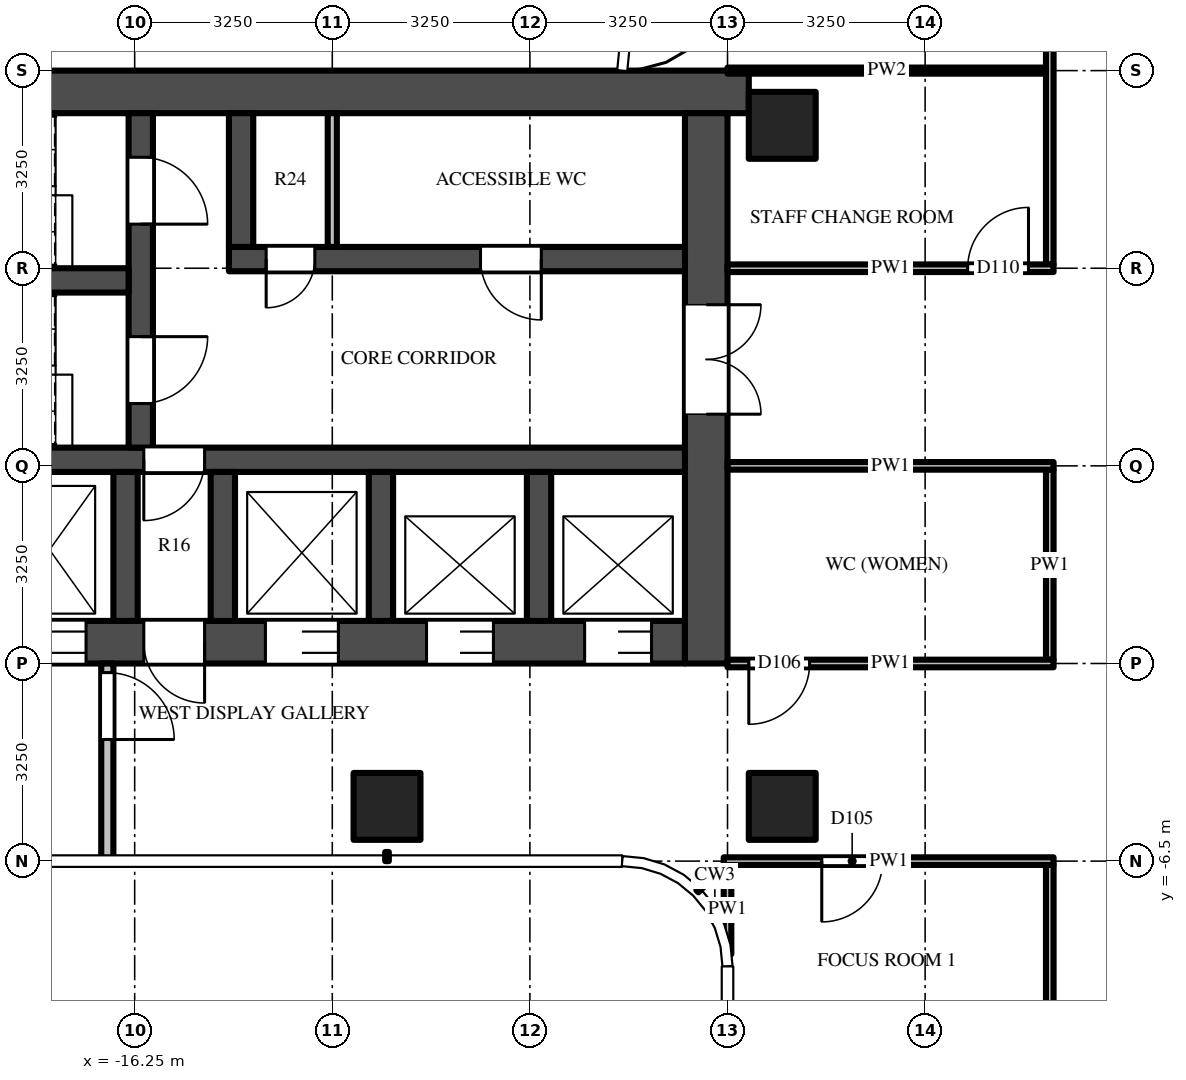
"""IFC4 building model, lengths in metres.
Left out: names, types, materials, properties, quantities, classifications, styles, units other than length and angle.
Written with IfcOpenShell. Run it as: python <this file> out.ifc"""

import sys

from ifc_helpers import new_model, si_unit, direction, frame, frame_2d, origin, origin_2d, place, context, subcontext, project, spatial, rectangle, extrude, source, transform, mapped, element, fill, save


model = new_model("IFC4")
c1 = context("Model", 3, precision=1e-05, world=origin(), true_north=direction((0.0, 1.0)))
c2 = subcontext(c1, "Body", "Model", "MODEL_VIEW")
j1 = project(units=[si_unit("LENGTHUNIT", "METRE"), si_unit("PLANEANGLEUNIT", "RADIAN")], contexts=[c1])
p1 = place(None, origin())
s1 = spatial("IfcSite", under=j1, at=p1, CompositionType="ELEMENT")
p2 = place(p1, origin())
s2 = spatial("IfcBuilding", under=s1, at=p2, CompositionType="ELEMENT")
p3 = place(p2, frame((0.0, 0.0, 220.7)))
s3 = spatial("IfcBuildingStorey", under=s2, at=p3, CompositionType="ELEMENT", Elevation=220.7)
m1 = source(origin(), c2, "Body", "SweptSolid", [
    extrude(rectangle(XDim=1.1, YDim=1.1, at=origin_2d()), origin(), (0.0, 0.0, 1.0), 3.9),
])
for number, where, z_axis, x_axis in (
    (1, (-5.6, 5.6, 0.0), (0.0, 0.0, 1.0), (1.0, 0.0, 0.0)),
    (2, (-5.6, -5.6, 0.0), (0.0, 0.0, 1.0), (1.0, 0.0, 0.0)),
    (3, (-12.1, -5.6, 0.0), (0.0, 0.0, 1.0), (1.0, 0.0, 0.0)),
):
    element("IfcColumn", number, at=place(p3, frame(where, z_axis=z_axis, x_axis=x_axis)), inside=s3, PredefinedType="COLUMN", context=c2, shape_type="MappedRepresentation", body=[
        mapped(m1, transform((0.0, 0.0, 0.0))),
    ])
m2 = source(origin(), c2, "Body", "SweptSolid", [
    extrude(rectangle(XDim=16.6, YDim=0.7, at=frame_2d((8.3, 0.0))), origin(), (0.0, 0.0, 1.0), 3.7),
])
p4 = place(p3, frame((-6.15, 6.15, 0.0), z_axis=(0.0, 0.0, 1.0), x_axis=(-1.0, 0.0, 0.0)))
e4 = element("IfcWall", 4, at=p4, inside=s3, PredefinedType="SHEAR", context=c2, shape_type="MappedRepresentation", body=[
    mapped(m2, transform((0.0, 0.0, 0.0))),
])
m3 = source(origin(), c2, "Body", "SweptSolid", [
    extrude(rectangle(XDim=14.85, YDim=0.7, at=frame_2d((7.425, 0.0))), origin(), (0.0, 0.0, 1.0), 3.7),
])
p5 = place(p3, frame((-7.2, -2.9, 0.0), z_axis=(0.0, 0.0, 1.0), x_axis=(-1.0, 0.0, 0.0)))
e5 = element("IfcWall", 5, at=p5, inside=s3, PredefinedType="SHEAR", context=c2, shape_type="MappedRepresentation", body=[
    mapped(m3, transform((0.0, 0.0, 0.0))),
])
m4 = source(origin(), c2, "Body", "SweptSolid", [
    extrude(rectangle(XDim=1.1, YDim=2.1, at=frame_2d((0.55, 1.05))), frame((0.0, 0.36, 0.0), z_axis=(0.0, -1.0, 0.0), x_axis=(1.0, 0.0, 0.0)), (0.0, 0.0, 1.0), 0.72),
])
p6 = place(p5, frame((0.55, 0.0, 0.0)))
e6 = element("IfcOpeningElement", 6, at=p6, cuts=e5, PredefinedType="OPENING", context=c2, shape_type="MappedRepresentation", body=[
    mapped(m4, transform((0.0, 0.0, 0.0))),
])
p7 = place(p5, frame((3.15, 0.0, 0.0)))
e7 = element("IfcOpeningElement", 7, at=p7, cuts=e5, PredefinedType="OPENING", context=c2, shape_type="MappedRepresentation", body=[
    mapped(m4, transform((0.0, 0.0, 0.0))),
])
m5 = source(origin(), c2, "Body", "SweptSolid", [
    extrude(rectangle(XDim=1.2, YDim=2.1, at=frame_2d((0.6, 1.05))), frame((0.0, 0.36, 0.0), z_axis=(0.0, -1.0, 0.0), x_axis=(1.0, 0.0, 0.0)), (0.0, 0.0, 1.0), 0.72),
])
p8 = place(p5, frame((5.7, 0.0, 0.0)))
e8 = element("IfcOpeningElement", 8, at=p8, cuts=e5, PredefinedType="OPENING", context=c2, shape_type="MappedRepresentation", body=[
    mapped(m5, transform((0.0, 0.0, 0.0))),
])
m6 = source(origin(), c2, "Body", "SweptSolid", [
    extrude(rectangle(XDim=1.3, YDim=2.1, at=frame_2d((0.65, 1.05))), frame((0.0, 0.36, 0.0), z_axis=(0.0, -1.0, 0.0), x_axis=(1.0, 0.0, 0.0)), (0.0, 0.0, 1.0), 0.72),
])
p9 = place(p5, frame((12.2, 0.0, 0.0)))
e9 = element("IfcOpeningElement", 9, at=p9, cuts=e5, PredefinedType="OPENING", context=c2, shape_type="MappedRepresentation", body=[
    mapped(m6, transform((0.0, 0.0, 0.0))),
])
p10 = place(p5, frame((9.85, 0.0, 0.0)))
e10 = element("IfcOpeningElement", 10, at=p10, cuts=e5, PredefinedType="OPENING", context=c2, shape_type="MappedRepresentation", body=[
    mapped(m5, transform((0.0, 0.0, 0.0))),
])
m7 = source(origin(), c2, "Body", "SweptSolid", [
    extrude(rectangle(XDim=1.0, YDim=2.1, at=frame_2d((0.5, 1.05))), frame((0.0, 0.36, 0.0), z_axis=(0.0, -1.0, 0.0), x_axis=(1.0, 0.0, 0.0)), (0.0, 0.0, 1.0), 0.72),
])
p11 = place(p5, frame((7.9, 0.0, 0.0)))
e11 = element("IfcOpeningElement", 11, at=p11, cuts=e5, PredefinedType="OPENING", context=c2, shape_type="MappedRepresentation", body=[
    mapped(m7, transform((0.0, 0.0, 0.0))),
])
m8 = source(origin(), c2, "Body", "SweptSolid", [
    extrude(rectangle(XDim=9.05, YDim=0.7, at=frame_2d((4.525, 0.0))), origin(), (0.0, 0.0, 1.0), 3.7),
])
p12 = place(p3, frame((-6.85, 5.8, 0.0), z_axis=(0.0, 0.0, 1.0), x_axis=(0.0, -1.0, 0.0)))
e12 = element("IfcWall", 12, at=p12, inside=s3, PredefinedType="SHEAR", context=c2, shape_type="MappedRepresentation", body=[
    mapped(m8, transform((0.0, 0.0, 0.0))),
])
m9 = source(origin(), c2, "Body", "SweptSolid", [
    extrude(rectangle(XDim=1.8, YDim=2.1, at=frame_2d((0.9, 1.05))), frame((0.0, 0.36, 0.0), z_axis=(0.0, -1.0, 0.0), x_axis=(1.0, 0.0, 0.0)), (0.0, 0.0, 1.0), 0.72),
])
p13 = place(p12, frame((3.15, 0.0, 0.0)))
e13 = element("IfcOpeningElement", 13, at=p13, cuts=e12, PredefinedType="OPENING", context=c2, shape_type="MappedRepresentation", body=[
    mapped(m9, transform((0.0, 0.0, 0.0))),
])
m10 = source(origin(), c2, "Body", "SweptSolid", [
    extrude(rectangle(XDim=7.5, YDim=0.4, at=frame_2d((3.75, 0.0))), origin(), (0.0, 0.0, 1.0), 3.7),
])
p14 = place(p3, frame((-7.2, 3.4, 0.0), z_axis=(0.0, 0.0, 1.0), x_axis=(-1.0, 0.0, 0.0)))
e14 = element("IfcWall", 14, at=p14, inside=s3, PredefinedType="SHEAR", context=c2, shape_type="MappedRepresentation", body=[
    mapped(m10, transform((0.0, 0.0, 0.0))),
])
m11 = source(origin(), c2, "Body", "SweptSolid", [
    extrude(rectangle(XDim=1.0, YDim=2.1, at=frame_2d((0.5, 1.05))), frame((0.0, 0.21, 0.0), z_axis=(0.0, -1.0, 0.0), x_axis=(1.0, 0.0, 0.0)), (0.0, 0.0, 1.0), 0.42),
])
p15 = place(p14, frame((2.363, 0.0, 0.0)))
e15 = element("IfcOpeningElement", 15, at=p15, cuts=e14, PredefinedType="OPENING", context=c2, shape_type="MappedRepresentation", body=[
    mapped(m11, transform((0.0, 0.0, 0.0))),
])
m12 = source(origin(), c2, "Body", "SweptSolid", [
    extrude(rectangle(XDim=0.8, YDim=2.1, at=frame_2d((0.4, 1.05))), frame((0.0, 0.21, 0.0), z_axis=(0.0, -1.0, 0.0), x_axis=(1.0, 0.0, 0.0)), (0.0, 0.0, 1.0), 0.42),
])
p16 = place(p14, frame((6.087, 0.0, 0.0)))
e16 = element("IfcOpeningElement", 16, at=p16, cuts=e14, PredefinedType="OPENING", context=c2, shape_type="MappedRepresentation", body=[
    mapped(m12, transform((0.0, 0.0, 0.0))),
])
m13 = source(origin(), c2, "Body", "SweptSolid", [
    extrude(rectangle(XDim=14.85, YDim=0.4, at=frame_2d((7.425, 0.0))), origin(), (0.0, 0.0, 1.0), 3.7),
])
p17 = place(p3, frame((-7.2, 0.1, 0.0), z_axis=(0.0, 0.0, 1.0), x_axis=(-1.0, 0.0, 0.0)))
e17 = element("IfcWall", 17, at=p17, inside=s3, PredefinedType="SHEAR", context=c2, shape_type="MappedRepresentation", body=[
    mapped(m13, transform((0.0, 0.0, 0.0))),
])
p18 = place(p17, frame((7.9, 0.0, 0.0)))
e18 = element("IfcOpeningElement", 18, at=p18, cuts=e17, PredefinedType="OPENING", context=c2, shape_type="MappedRepresentation", body=[
    mapped(m11, transform((0.0, 0.0, 0.0))),
])
m14 = source(origin(), c2, "Body", "SweptSolid", [
    extrude(rectangle(XDim=5.5, YDim=0.4, at=frame_2d((2.75, 0.0))), origin(), (0.0, 0.0, 1.0), 3.7),
])
p19 = place(p3, frame((-16.15, 5.8, 0.0), z_axis=(0.0, 0.0, 1.0), x_axis=(0.0, -1.0, 0.0)))
e19 = element("IfcWall", 19, at=p19, inside=s3, PredefinedType="SHEAR", context=c2, shape_type="MappedRepresentation", body=[
    mapped(m14, transform((0.0, 0.0, 0.0))),
])
m15 = source(origin(), c2, "Body", "SweptSolid", [
    extrude(rectangle(XDim=1.1, YDim=2.1, at=frame_2d((0.55, 1.05))), frame((0.0, 0.21, 0.0), z_axis=(0.0, -1.0, 0.0), x_axis=(1.0, 0.0, 0.0)), (0.0, 0.0, 1.0), 0.42),
])
p20 = place(p19, frame((0.725, 0.0, 0.0)))
e20 = element("IfcOpeningElement", 20, at=p20, cuts=e19, PredefinedType="OPENING", context=c2, shape_type="MappedRepresentation", body=[
    mapped(m15, transform((0.0, 0.0, 0.0))),
])
p21 = place(p19, frame((3.675, 0.0, 0.0)))
e21 = element("IfcOpeningElement", 21, at=p21, cuts=e19, PredefinedType="OPENING", context=c2, shape_type="MappedRepresentation", body=[
    mapped(m15, transform((0.0, 0.0, 0.0))),
])
m16 = source(origin(), c2, "Body", "SweptSolid", [
    extrude(rectangle(XDim=5.7, YDim=0.4, at=frame_2d((2.85, 0.0))), origin(), (0.0, 0.0, 1.0), 3.7),
])
p22 = place(p3, frame((-16.35, 3.05, 0.0), z_axis=(0.0, 0.0, 1.0), x_axis=(-1.0, 0.0, 0.0)))
e22 = element("IfcWall", 22, at=p22, inside=s3, PredefinedType="SHEAR", context=c2, shape_type="MappedRepresentation", body=[
    mapped(m16, transform((0.0, 0.0, 0.0))),
])
m17 = source(origin(), c2, "Body", "SweptSolid", [
    extrude(rectangle(XDim=2.2, YDim=0.4, at=frame_2d((1.1, 0.0))), origin(), (0.0, 0.0, 1.0), 3.7),
])
p23 = place(p3, frame((-14.5, 5.8, 0.0), z_axis=(0.0, 0.0, 1.0), x_axis=(0.0, -1.0, 0.0)))
e23 = element("IfcWall", 23, at=p23, inside=s3, PredefinedType="SHEAR", context=c2, shape_type="MappedRepresentation", body=[
    mapped(m17, transform((0.0, 0.0, 0.0))),
])
m18 = source(origin(), c2, "Body", "SweptSolid", [
    extrude(rectangle(XDim=2.45, YDim=0.4, at=frame_2d((1.225, 0.0))), origin(), (0.0, 0.0, 1.0), 3.7),
])
for number, where, z_axis, x_axis in (
    (24, (-9.6, -0.1, 0.0), (0.0, 0.0, 1.0), (0.0, -1.0, 0.0)),
    (25, (-12.2, -0.1, 0.0), (0.0, 0.0, 1.0), (0.0, -1.0, 0.0)),
    (26, (-14.8, -0.1, 0.0), (0.0, 0.0, 1.0), (0.0, -1.0, 0.0)),
    (27, (-16.4, -0.1, 0.0), (0.0, 0.0, 1.0), (0.0, -1.0, 0.0)),
):
    element("IfcWall", number, at=place(p3, frame(where, z_axis=z_axis, x_axis=x_axis)), inside=s3, PredefinedType="SHEAR", context=c2, shape_type="MappedRepresentation", body=[
        mapped(m18, transform((0.0, 0.0, 0.0))),
    ])
m19 = source(origin(), c2, "Body", "SweptSolid", [
    extrude(rectangle(XDim=3.25, YDim=0.2, at=frame_2d((1.625, 0.0))), origin(), (0.0, 0.0, 1.0), 3.7),
])
p24 = place(p3, frame((-16.7, -3.25, 0.0), z_axis=(0.0, 0.0, 1.0), x_axis=(0.0, -1.0, 0.0)))
e28 = element("IfcWall", 28, at=p24, inside=s3, PredefinedType="PARTITIONING", context=c2, shape_type="MappedRepresentation", body=[
    mapped(m19, transform((0.0, 0.0, 0.0))),
])
m20 = source(origin(), c2, "Body", "SweptSolid", [
    extrude(rectangle(XDim=1.1, YDim=2.1, at=frame_2d((0.55, 1.05))), frame((0.0, 0.11, 0.0), z_axis=(0.0, -1.0, 0.0), x_axis=(1.0, 0.0, 0.0)), (0.0, 0.0, 1.0), 0.22),
])
p25 = place(p24, frame((0.15, 0.0, 0.0)))
e29 = element("IfcOpeningElement", 29, at=p25, cuts=e28, PredefinedType="OPENING", context=c2, shape_type="MappedRepresentation", body=[
    mapped(m20, transform((0.0, 0.0, 0.0))),
])
m21 = source(origin(), c2, "Body", "SweptSolid", [
    extrude(rectangle(XDim=2.2, YDim=0.15, at=frame_2d((1.1, 0.0))), origin(), (0.0, 0.0, 1.0), 3.7),
])
p26 = place(p3, frame((-13.0, 5.8, 0.0), z_axis=(0.0, 0.0, 1.0), x_axis=(0.0, -1.0, 0.0)))
e30 = element("IfcWall", 30, at=p26, inside=s3, PredefinedType="PARTITIONING", context=c2, shape_type="MappedRepresentation", body=[
    mapped(m21, transform((0.0, 0.0, 0.0))),
])
m22 = source(origin(), c2, "Body", "SweptSolid", [
    extrude(rectangle(XDim=1.469, YDim=0.125, at=frame_2d((0.734, 0.0))), origin(), (0.0, 0.0, 1.0), 3.7),
])
p27 = place(p3, frame((-6.5, -6.562, 0.0), z_axis=(0.0, 0.0, 1.0), x_axis=(0.0, -1.0, 0.0)))
e31 = element("IfcWall", 31, at=p27, inside=s3, PredefinedType="PARTITIONING", context=c2, shape_type="MappedRepresentation", body=[
    mapped(m22, transform((0.0, 0.0, 0.0))),
])
m23 = source(origin(), c2, "Body", "SweptSolid", [
    extrude(rectangle(XDim=3.125, YDim=0.125, at=frame_2d((1.562, 0.0))), origin(), (0.0, 0.0, 1.0), 3.068),
])
p28 = place(p3, frame((-1.2, -0.062, 0.0), z_axis=(0.0, 0.0, 1.0), x_axis=(0.0, -1.0, 0.0)))
e32 = element("IfcWall", 32, at=p28, inside=s3, PredefinedType="PARTITIONING", context=c2, shape_type="MappedRepresentation", body=[
    mapped(m23, transform((0.0, 0.0, 0.0))),
])
m24 = source(origin(), c2, "Body", "SweptSolid", [
    extrude(rectangle(XDim=8.725, YDim=0.125, at=frame_2d((4.363, 0.0))), origin(), (0.0, 0.0, 1.0), 2.997),
])
p29 = place(p3, frame((-1.2, 12.038, 0.0), z_axis=(0.0, 0.0, 1.0), x_axis=(0.0, -1.0, 0.0)))
e33 = element("IfcWall", 33, at=p29, inside=s3, PredefinedType="PARTITIONING", context=c2, shape_type="MappedRepresentation", body=[
    mapped(m24, transform((0.0, 0.0, 0.0))),
])
m25 = source(origin(), c2, "Body", "SweptSolid", [
    extrude(rectangle(XDim=5.475, YDim=0.125, at=frame_2d((2.738, 0.0))), origin(), (0.0, 0.0, 1.0), 2.997),
])
p30 = place(p3, frame((-1.2, -12.038, 0.0), z_axis=(0.0, 0.0, 1.0), x_axis=(0.0, 1.0, 0.0)))
e34 = element("IfcWall", 34, at=p30, inside=s3, PredefinedType="PARTITIONING", context=c2, shape_type="MappedRepresentation", body=[
    mapped(m25, transform((0.0, 0.0, 0.0))),
])
m26 = source(origin(), c2, "Body", "SweptSolid", [
    extrude(rectangle(XDim=1.0, YDim=2.1, at=frame_2d((0.5, 1.05))), frame((0.0, 0.073, 0.0), z_axis=(0.0, -1.0, 0.0), x_axis=(1.0, 0.0, 0.0)), (0.0, 0.0, 1.0), 0.145),
])
p31 = place(p30, frame((0.938, 0.0, 0.0)))
e35 = element("IfcOpeningElement", 35, at=p31, cuts=e34, PredefinedType="OPENING", context=c2, shape_type="MappedRepresentation", body=[
    mapped(m26, transform((0.0, 0.0, 0.0))),
])
m27 = source(origin(), c2, "Body", "SweptSolid", [
    extrude(rectangle(XDim=5.425, YDim=0.125, at=frame_2d((2.712, 0.0))), origin(), (0.0, 0.0, 1.0), 2.78),
])
p32 = place(p3, frame((-1.137, -6.5, 0.0), z_axis=(0.0, 0.0, 1.0), x_axis=(-1.0, 0.0, 0.0)))
e36 = element("IfcWall", 36, at=p32, inside=s3, PredefinedType="PARTITIONING", context=c2, shape_type="MappedRepresentation", body=[
    mapped(m27, transform((0.0, 0.0, 0.0))),
])
p33 = place(p32, frame((2.812, 0.0, 0.0)))
e37 = element("IfcOpeningElement", 37, at=p33, cuts=e36, PredefinedType="OPENING", context=c2, shape_type="MappedRepresentation", body=[
    mapped(m26, transform((0.0, 0.0, 0.0))),
])
m28 = source(origin(), c2, "Body", "SweptSolid", [
    extrude(rectangle(XDim=5.363, YDim=0.125, at=frame_2d((2.681, 0.0))), origin(), (0.0, 0.0, 1.0), 2.997),
])
p34 = place(p3, frame((-1.137, -3.25, 0.0), z_axis=(0.0, 0.0, 1.0), x_axis=(-1.0, 0.0, 0.0)))
e38 = element("IfcWall", 38, at=p34, inside=s3, PredefinedType="PARTITIONING", context=c2, shape_type="MappedRepresentation", body=[
    mapped(m28, transform((0.0, 0.0, 0.0))),
])
p35 = place(p34, frame((4.012, 0.0, 0.0)))
e39 = element("IfcOpeningElement", 39, at=p35, cuts=e38, PredefinedType="OPENING", context=c2, shape_type="MappedRepresentation", body=[
    mapped(m26, transform((0.0, 0.0, 0.0))),
])
p36 = place(p3, frame((-1.137, 0.0, 0.0), z_axis=(0.0, 0.0, 1.0), x_axis=(-1.0, 0.0, 0.0)))
e40 = element("IfcWall", 40, at=p36, inside=s3, PredefinedType="PARTITIONING", context=c2, shape_type="MappedRepresentation", body=[
    mapped(m28, transform((0.0, 0.0, 0.0))),
])
p37 = place(p3, frame((-6.5, 3.25, 0.0), z_axis=(0.0, 0.0, 1.0), x_axis=(1.0, 0.0, 0.0)))
e41 = element("IfcWall", 41, at=p37, inside=s3, PredefinedType="PARTITIONING", context=c2, shape_type="MappedRepresentation", body=[
    mapped(m28, transform((0.0, 0.0, 0.0))),
])
p38 = place(p37, frame((3.95, 0.0, 0.0)))
e42 = element("IfcOpeningElement", 42, at=p38, cuts=e41, PredefinedType="OPENING", context=c2, shape_type="MappedRepresentation", body=[
    mapped(m26, transform((0.0, 0.0, 0.0))),
])
m29 = source(origin(), c2, "Body", "SweptSolid", [
    extrude(rectangle(XDim=5.238, YDim=0.1, at=frame_2d((2.619, 0.0))), origin(), (0.0, 0.0, 1.0), 2.78),
])
p39 = place(p3, frame((-6.5, 6.5, 0.0), z_axis=(0.0, 0.0, 1.0), x_axis=(1.0, 0.0, 0.0)))
e43 = element("IfcWall", 43, at=p39, inside=s3, PredefinedType="PARTITIONING", context=c2, shape_type="MappedRepresentation", body=[
    mapped(m29, transform((0.0, 0.0, 0.0))),
])
m30 = source(origin(), c2, "Body", "SweptSolid", [
    extrude(rectangle(XDim=1.1, YDim=2.1, at=frame_2d((0.55, 1.05))), frame((0.0, -0.275, 0.0), z_axis=(0.0, -1.0, 0.0), x_axis=(1.0, 0.0, 0.0)), (0.0, 0.0, 1.0), 0.05),
])
p40 = place(p6, origin())
e44 = element("IfcDoor", 44, at=p40, inside=s3, OperationType="DOUBLE_DOOR_SLIDING", PredefinedType="DOOR", context=c2, shape_type="MappedRepresentation", body=[
    mapped(m30, transform((0.0, 0.0, 0.0))),
])
fill(e6, e44)
p41 = place(p7, origin())
e45 = element("IfcDoor", 45, at=p41, inside=s3, OperationType="DOUBLE_DOOR_SLIDING", PredefinedType="DOOR", context=c2, shape_type="MappedRepresentation", body=[
    mapped(m30, transform((0.0, 0.0, 0.0))),
])
fill(e7, e45)
m31 = source(origin(), c2, "Body", "SweptSolid", [
    extrude(rectangle(XDim=1.2, YDim=2.1, at=frame_2d((0.6, 1.05))), frame((0.0, -0.275, 0.0), z_axis=(0.0, -1.0, 0.0), x_axis=(1.0, 0.0, 0.0)), (0.0, 0.0, 1.0), 0.05),
])
p42 = place(p8, origin())
e46 = element("IfcDoor", 46, at=p42, inside=s3, OperationType="DOUBLE_DOOR_SLIDING", PredefinedType="DOOR", context=c2, shape_type="MappedRepresentation", body=[
    mapped(m31, transform((0.0, 0.0, 0.0))),
])
fill(e8, e46)
p43 = place(p10, origin())
e47 = element("IfcDoor", 47, at=p43, inside=s3, OperationType="DOUBLE_DOOR_SLIDING", PredefinedType="DOOR", context=c2, shape_type="MappedRepresentation", body=[
    mapped(m31, transform((0.0, 0.0, 0.0))),
])
fill(e10, e47)
m32 = source(origin(), c2, "Body", "SweptSolid", [
    extrude(rectangle(XDim=1.8, YDim=2.1, at=frame_2d((0.9, 1.05))), frame((0.0, -0.275, 0.0), z_axis=(0.0, -1.0, 0.0), x_axis=(1.0, 0.0, 0.0)), (0.0, 0.0, 1.0), 0.05),
])
p44 = place(p13, origin())
e48 = element("IfcDoor", 48, at=p44, inside=s3, OperationType="DOUBLE_DOOR_SINGLE_SWING", PredefinedType="DOOR", context=c2, shape_type="MappedRepresentation", body=[
    mapped(m32, transform((0.0, 0.0, 0.0))),
])
fill(e13, e48)
m33 = source(origin(), c2, "Body", "SweptSolid", [
    extrude(rectangle(XDim=1.1, YDim=2.1, at=frame_2d((0.55, 1.05))), frame((0.0, 0.025, 0.0), z_axis=(0.0, -1.0, 0.0), x_axis=(1.0, 0.0, 0.0)), (0.0, 0.0, 1.0), 0.05),
])
p45 = place(p20, origin())
e49 = element("IfcDoor", 49, at=p45, inside=s3, OperationType="SINGLE_SWING_RIGHT", PredefinedType="DOOR", context=c2, shape_type="MappedRepresentation", body=[
    mapped(m33, transform((0.0, 0.0, 0.0))),
])
fill(e20, e49)
p46 = place(p21, origin())
e50 = element("IfcDoor", 50, at=p46, inside=s3, OperationType="SINGLE_SWING_LEFT", PredefinedType="DOOR", context=c2, shape_type="MappedRepresentation", body=[
    mapped(m33, transform((0.0, 0.0, 0.0))),
])
fill(e21, e50)
m34 = source(origin(), c2, "Body", "SweptSolid", [
    extrude(rectangle(XDim=1.0, YDim=2.1, at=frame_2d((0.5, 1.05))), frame((0.0, 0.025, 0.0), z_axis=(0.0, -1.0, 0.0), x_axis=(1.0, 0.0, 0.0)), (0.0, 0.0, 1.0), 0.05),
])
p47 = place(p18, origin())
e51 = element("IfcDoor", 51, at=p47, inside=s3, OperationType="SINGLE_SWING_RIGHT", PredefinedType="DOOR", context=c2, shape_type="MappedRepresentation", body=[
    mapped(m34, transform((0.0, 0.0, 0.0))),
])
fill(e18, e51)
m35 = source(origin(), c2, "Body", "SweptSolid", [
    extrude(rectangle(XDim=1.0, YDim=2.1, at=frame_2d((0.5, 1.05))), frame((0.0, -0.275, 0.0), z_axis=(0.0, -1.0, 0.0), x_axis=(1.0, 0.0, 0.0)), (0.0, 0.0, 1.0), 0.05),
])
p48 = place(p11, origin())
e52 = element("IfcDoor", 52, at=p48, inside=s3, OperationType="SINGLE_SWING_LEFT", PredefinedType="DOOR", context=c2, shape_type="MappedRepresentation", body=[
    mapped(m35, transform((0.0, 0.0, 0.0))),
])
fill(e11, e52)
p49 = place(p25, origin())
e53 = element("IfcDoor", 53, at=p49, inside=s3, OperationType="SINGLE_SWING_RIGHT", PredefinedType="DOOR", context=c2, shape_type="MappedRepresentation", body=[
    mapped(m33, transform((0.0, 0.0, 0.0))),
])
fill(e29, e53)
p50 = place(p15, origin())
e54 = element("IfcDoor", 54, at=p50, inside=s3, OperationType="SINGLE_SWING_LEFT", PredefinedType="DOOR", context=c2, shape_type="MappedRepresentation", body=[
    mapped(m34, transform((0.0, 0.0, 0.0))),
])
fill(e15, e54)
m36 = source(origin(), c2, "Body", "SweptSolid", [
    extrude(rectangle(XDim=0.8, YDim=2.1, at=frame_2d((0.4, 1.05))), frame((0.0, 0.025, 0.0), z_axis=(0.0, -1.0, 0.0), x_axis=(1.0, 0.0, 0.0)), (0.0, 0.0, 1.0), 0.05),
])
p51 = place(p16, origin())
e55 = element("IfcDoor", 55, at=p51, inside=s3, OperationType="SINGLE_SWING_RIGHT", PredefinedType="DOOR", context=c2, shape_type="MappedRepresentation", body=[
    mapped(m36, transform((0.0, 0.0, 0.0))),
])
fill(e16, e55)
p52 = place(p33, origin())
e56 = element("IfcDoor", 56, at=p52, inside=s3, OperationType="SINGLE_SWING_RIGHT", PredefinedType="DOOR", context=c2, shape_type="MappedRepresentation", body=[
    mapped(m34, transform((0.0, 0.0, 0.0))),
])
fill(e37, e56)
p53 = place(p35, origin())
e57 = element("IfcDoor", 57, at=p53, inside=s3, OperationType="SINGLE_SWING_RIGHT", PredefinedType="DOOR", context=c2, shape_type="MappedRepresentation", body=[
    mapped(m34, transform((0.0, 0.0, 0.0))),
])
fill(e39, e57)
p54 = place(p38, origin())
e58 = element("IfcDoor", 58, at=p54, inside=s3, OperationType="SINGLE_SWING_RIGHT", PredefinedType="DOOR", context=c2, shape_type="MappedRepresentation", body=[
    mapped(m34, transform((0.0, 0.0, 0.0))),
])
fill(e42, e58)
save(model, sys.argv[1])
